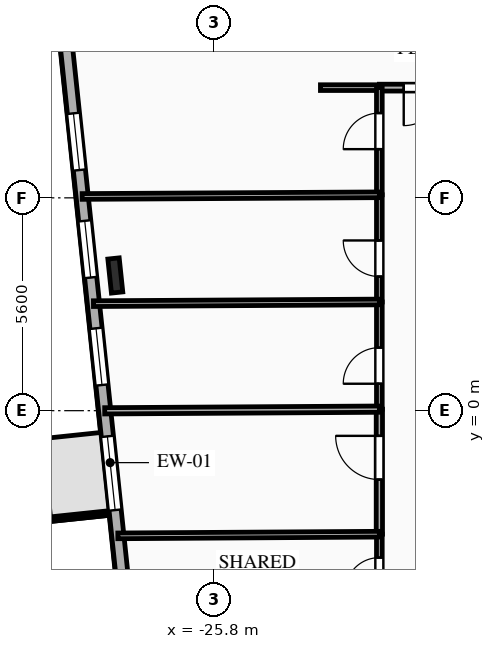
"""IFC4 building model, lengths in metres.
Left out: names, types, materials, properties, quantities, classifications, styles, units other than length and angle.
Written with IfcOpenShell. Run it as: python <this file> out.ifc"""

import sys

from ifc_helpers import new_model, si_unit, direction, frame, frame_2d, origin, origin_2d, place, context, subcontext, project, spatial, rectangle, i_section, extrude, element, fill, save


model = new_model("IFC4")
c1 = context("Model", 3, precision=1e-05, world=origin(), true_north=direction((0.0, 1.0)))
c2 = subcontext(c1, "Body", "Model", "MODEL_VIEW")
j1 = project(units=[si_unit("LENGTHUNIT", "METRE"), si_unit("PLANEANGLEUNIT", "RADIAN")], contexts=[c1])
p1 = place(None, origin())
s1 = spatial("IfcSite", under=j1, at=p1, CompositionType="ELEMENT")
p2 = place(p1, origin())
s2 = spatial("IfcBuilding", under=s1, at=p2, CompositionType="ELEMENT")
p3 = place(p2, frame((0.0, 0.0, 95.75)))
s3 = spatial("IfcBuildingStorey", under=s2, at=p3, CompositionType="ELEMENT", Elevation=95.75)
p4 = place(p3, frame((-28.398, 3.557, 0.0), z_axis=(0.0, 0.0, 1.0), x_axis=(0.994521895368, 0.104528463268, 0.0)))
e1 = element("IfcColumn", 1, at=p4, inside=s3, PredefinedType="COLUMN", context=c2, shape_type="SweptSolid", body=[
    extrude(i_section(OverallWidth=0.3, OverallDepth=0.9, WebThickness=0.019, FlangeThickness=0.035, FilletRadius=0.03, at=origin_2d()), origin(), (0.0, 0.0, 1.0), 3.35),
])
p5 = place(p3, frame((-26.935, -16.583, 0.0), z_axis=(0.0, 0.0, 1.0), x_axis=(-0.104524887486, 0.994522271192, 0.0)))
e2 = element("IfcWall", 2, at=p5, inside=s3, PredefinedType="SOLIDWALL", context=c2, shape_type="SweptSolid", body=[
    extrude(rectangle(XDim=30.6, YDim=0.32, at=frame_2d((15.3, 0.0))), origin(), (0.0, 0.0, 1.0), 3.045),
])
p6 = place(p5, frame((14.045, 0.0, 0.85)))
e3 = element("IfcOpeningElement", 3, at=p6, cuts=e2, PredefinedType="OPENING", context=c2, shape_type="SweptSolid", body=[
    extrude(rectangle(XDim=1.95, YDim=1.85, at=frame_2d((0.975, 0.925))), frame((0.0, 0.17, 0.0), z_axis=(0.0, -1.0, 0.0), x_axis=(1.0, 0.0, 0.0)), (0.0, 0.0, 1.0), 0.34),
])
p7 = place(p5, frame((17.354, 0.0, 0.85)))
e4 = element("IfcOpeningElement", 4, at=p7, cuts=e2, PredefinedType="OPENING", context=c2, shape_type="SweptSolid", body=[
    extrude(rectangle(XDim=1.5, YDim=1.85, at=frame_2d((0.75, 0.925))), frame((0.0, 0.17, 0.0), z_axis=(0.0, -1.0, 0.0), x_axis=(1.0, 0.0, 0.0)), (0.0, 0.0, 1.0), 0.34),
])
p8 = place(p5, frame((20.198, 0.0, 0.85)))
e5 = element("IfcOpeningElement", 5, at=p8, cuts=e2, PredefinedType="OPENING", context=c2, shape_type="SweptSolid", body=[
    extrude(rectangle(XDim=1.5, YDim=1.85, at=frame_2d((0.75, 0.925))), frame((0.0, 0.17, 0.0), z_axis=(0.0, -1.0, 0.0), x_axis=(1.0, 0.0, 0.0)), (0.0, 0.0, 1.0), 0.34),
])
p9 = place(p5, frame((23.041, 0.0, 0.85)))
e6 = element("IfcOpeningElement", 6, at=p9, cuts=e2, PredefinedType="OPENING", context=c2, shape_type="SweptSolid", body=[
    extrude(rectangle(XDim=1.5, YDim=1.85, at=frame_2d((0.75, 0.925))), frame((0.0, 0.17, 0.0), z_axis=(0.0, -1.0, 0.0), x_axis=(1.0, 0.0, 0.0)), (0.0, 0.0, 1.0), 0.34),
])
p10 = place(p3, frame((-18.8, 8.5, 0.0), z_axis=(0.0, 0.0, 1.0), x_axis=(-1.0, 0.0, 0.0)))
e7 = element("IfcWall", 7, at=p10, inside=s3, PredefinedType="PARTITIONING", context=c2, shape_type="SweptSolid", body=[
    extrude(rectangle(XDim=2.65, YDim=0.18, at=frame_2d((1.325, 0.0))), origin(), (0.0, 0.0, 1.0), 3.045),
])
p11 = place(p10, frame((1.009, 0.0, 0.0)))
e8 = element("IfcOpeningElement", 8, at=p11, cuts=e7, PredefinedType="OPENING", context=c2, shape_type="SweptSolid", body=[
    extrude(rectangle(XDim=1.0, YDim=2.15, at=frame_2d((0.5, 1.075))), frame((0.0, 0.1, 0.0), z_axis=(0.0, -1.0, 0.0), x_axis=(1.0, 0.0, 0.0)), (0.0, 0.0, 1.0), 0.2),
])
p12 = place(p3, frame((-21.45, 8.5, 0.0), z_axis=(0.0, 0.0, 1.0), x_axis=(-1.0, 0.0, 0.0)))
e9 = element("IfcWall", 9, at=p12, inside=s3, PredefinedType="PARTITIONING", context=c2, shape_type="SweptSolid", body=[
    extrude(rectangle(XDim=1.55, YDim=0.15, at=frame_2d((0.775, 0.0))), origin(), (0.0, 0.0, 1.0), 3.045),
])
p13 = place(p3, frame((-21.45, -5.6, 0.0), z_axis=(0.0, 0.0, 1.0), x_axis=(0.0, 1.0, 0.0)))
e10 = element("IfcWall", 10, at=p13, inside=s3, PredefinedType="PLUMBINGWALL", context=c2, shape_type="SweptSolid", body=[
    extrude(rectangle(XDim=2.35, YDim=0.15, at=frame_2d((1.175, 0.0))), origin(), (0.0, 0.0, 1.0), 3.045),
])
p14 = place(p13, frame((0.834, 0.0, 0.0)))
e11 = element("IfcOpeningElement", 11, at=p14, cuts=e10, PredefinedType="OPENING", context=c2, shape_type="SweptSolid", body=[
    extrude(rectangle(XDim=0.9, YDim=2.1, at=frame_2d((0.45, 1.05))), frame((0.0, 0.085, 0.0), z_axis=(0.0, -1.0, 0.0), x_axis=(1.0, 0.0, 0.0)), (0.0, 0.0, 1.0), 0.17),
])
p15 = place(p3, frame((-21.45, -3.25, 0.0), z_axis=(0.0, 0.0, 1.0), x_axis=(0.0, 1.0, 0.0)))
e12 = element("IfcWall", 12, at=p15, inside=s3, PredefinedType="PARTITIONING", context=c2, shape_type="SweptSolid", body=[
    extrude(rectangle(XDim=3.29, YDim=0.165, at=frame_2d((1.645, 0.0))), origin(), (0.0, 0.0, 1.0), 3.045),
])
p16 = place(p15, frame((1.438, 0.0, 0.0)))
e13 = element("IfcOpeningElement", 13, at=p16, cuts=e12, PredefinedType="OPENING", context=c2, shape_type="SweptSolid", body=[
    extrude(rectangle(XDim=1.15, YDim=2.15, at=frame_2d((0.575, 1.075))), frame((0.0, 0.093, 0.0), z_axis=(0.0, -1.0, 0.0), x_axis=(1.0, 0.0, 0.0)), (0.0, 0.0, 1.0), 0.185),
])
p17 = place(p3, frame((-21.45, 0.04, 0.0), z_axis=(0.0, 0.0, 1.0), x_axis=(0.0, 1.0, 0.0)))
e14 = element("IfcWall", 14, at=p17, inside=s3, PredefinedType="PARTITIONING", context=c2, shape_type="SweptSolid", body=[
    extrude(rectangle(XDim=2.82, YDim=0.15, at=frame_2d((1.41, 0.0))), origin(), (0.0, 0.0, 1.0), 3.045),
])
p18 = place(p17, frame((0.669, 0.0, 0.0)))
e15 = element("IfcOpeningElement", 15, at=p18, cuts=e14, PredefinedType="OPENING", context=c2, shape_type="SweptSolid", body=[
    extrude(rectangle(XDim=0.95, YDim=2.1, at=frame_2d((0.475, 1.05))), frame((0.0, 0.085, 0.0), z_axis=(0.0, -1.0, 0.0), x_axis=(1.0, 0.0, 0.0)), (0.0, 0.0, 1.0), 0.17),
])
p19 = place(p3, frame((-21.45, 2.86, 0.0), z_axis=(0.0, 0.0, 1.0), x_axis=(0.0, 1.0, 0.0)))
e16 = element("IfcWall", 16, at=p19, inside=s3, PredefinedType="PARTITIONING", context=c2, shape_type="SweptSolid", body=[
    extrude(rectangle(XDim=2.82, YDim=0.15, at=frame_2d((1.41, 0.0))), origin(), (0.0, 0.0, 1.0), 3.045),
])
p20 = place(p19, frame((0.669, 0.0, 0.0)))
e17 = element("IfcOpeningElement", 17, at=p20, cuts=e16, PredefinedType="OPENING", context=c2, shape_type="SweptSolid", body=[
    extrude(rectangle(XDim=0.95, YDim=2.1, at=frame_2d((0.475, 1.05))), frame((0.0, 0.085, 0.0), z_axis=(0.0, -1.0, 0.0), x_axis=(1.0, 0.0, 0.0)), (0.0, 0.0, 1.0), 0.17),
])
p21 = place(p3, frame((-21.45, 5.68, 0.0), z_axis=(0.0, 0.0, 1.0), x_axis=(0.0, 1.0, 0.0)))
e18 = element("IfcWall", 18, at=p21, inside=s3, PredefinedType="PARTITIONING", context=c2, shape_type="SweptSolid", body=[
    extrude(rectangle(XDim=2.82, YDim=0.15, at=frame_2d((1.41, 0.0))), origin(), (0.0, 0.0, 1.0), 3.045),
])
p22 = place(p21, frame((1.201, 0.0, 0.0)))
e19 = element("IfcOpeningElement", 19, at=p22, cuts=e18, PredefinedType="OPENING", context=c2, shape_type="SweptSolid", body=[
    extrude(rectangle(XDim=0.95, YDim=2.1, at=frame_2d((0.475, 1.05))), frame((0.0, 0.085, 0.0), z_axis=(0.0, -1.0, 0.0), x_axis=(1.0, 0.0, 0.0)), (0.0, 0.0, 1.0), 0.17),
])
p23 = place(p3, frame((-28.332, -3.294, 0.0), z_axis=(0.0, 0.0, 1.0), x_axis=(0.99997961062, 0.006385792383, 0.0)))
e20 = element("IfcWall", 20, at=p23, inside=s3, PredefinedType="PLUMBINGWALL", context=c2, shape_type="SweptSolid", body=[
    extrude(rectangle(XDim=6.882, YDim=0.15, at=frame_2d((3.441, 0.0))), origin(), (0.0, 0.0, 1.0), 3.045),
])
p24 = place(p3, frame((-28.677, -0.004, 0.0), z_axis=(0.0, 0.0, 1.0), x_axis=(0.999981514486, 0.006080352417, 0.0)))
e21 = element("IfcWall", 21, at=p24, inside=s3, PredefinedType="PARTITIONING", context=c2, shape_type="SweptSolid", body=[
    extrude(rectangle(XDim=7.228, YDim=0.165, at=frame_2d((3.614, 0.0))), origin(), (0.0, 0.0, 1.0), 3.045),
])
p25 = place(p3, frame((-28.974, 2.816, 0.0), z_axis=(0.0, 0.0, 1.0), x_axis=(0.999982942193, 0.00584083232, 0.0)))
e22 = element("IfcWall", 22, at=p25, inside=s3, PredefinedType="PARTITIONING", context=c2, shape_type="SweptSolid", body=[
    extrude(rectangle(XDim=7.524, YDim=0.15, at=frame_2d((3.762, 0.0))), origin(), (0.0, 0.0, 1.0), 2.53),
])
p26 = place(p3, frame((-29.27, 5.636, 0.0), z_axis=(0.0, 0.0, 1.0), x_axis=(0.999984210669, 0.005619467326, 0.0)))
e23 = element("IfcWall", 23, at=p26, inside=s3, PredefinedType="PARTITIONING", context=c2, shape_type="SweptSolid", body=[
    extrude(rectangle(XDim=7.82, YDim=0.15, at=frame_2d((3.91, 0.0))), origin(), (0.0, 0.0, 1.0), 3.045),
])
p27 = place(p6, origin())
e24 = element("IfcWindow", 24, at=p27, inside=s3, PartitioningType="SINGLE_PANEL", PredefinedType="WINDOW", context=c2, shape_type="SweptSolid", body=[
    extrude(rectangle(XDim=1.95, YDim=1.85, at=frame_2d((0.975, 0.925))), frame((0.0, 0.03, 0.0), z_axis=(0.0, -1.0, 0.0), x_axis=(1.0, 0.0, 0.0)), (0.0, 0.0, 1.0), 0.06),
])
fill(e3, e24)
p28 = place(p7, origin())
e25 = element("IfcWindow", 25, at=p28, inside=s3, PartitioningType="SINGLE_PANEL", PredefinedType="WINDOW", context=c2, shape_type="SweptSolid", body=[
    extrude(rectangle(XDim=1.5, YDim=1.85, at=frame_2d((0.75, 0.925))), frame((0.0, 0.03, 0.0), z_axis=(0.0, -1.0, 0.0), x_axis=(1.0, 0.0, 0.0)), (0.0, 0.0, 1.0), 0.06),
])
fill(e4, e25)
p29 = place(p8, origin())
e26 = element("IfcWindow", 26, at=p29, inside=s3, PartitioningType="SINGLE_PANEL", PredefinedType="WINDOW", context=c2, shape_type="SweptSolid", body=[
    extrude(rectangle(XDim=1.5, YDim=1.85, at=frame_2d((0.75, 0.925))), frame((0.0, 0.03, 0.0), z_axis=(0.0, -1.0, 0.0), x_axis=(1.0, 0.0, 0.0)), (0.0, 0.0, 1.0), 0.06),
])
fill(e5, e26)
p30 = place(p9, origin())
e27 = element("IfcWindow", 27, at=p30, inside=s3, PartitioningType="SINGLE_PANEL", PredefinedType="WINDOW", context=c2, shape_type="SweptSolid", body=[
    extrude(rectangle(XDim=1.5, YDim=1.85, at=frame_2d((0.75, 0.925))), frame((0.0, 0.03, 0.0), z_axis=(0.0, -1.0, 0.0), x_axis=(1.0, 0.0, 0.0)), (0.0, 0.0, 1.0), 0.06),
])
fill(e6, e27)
p31 = place(p11, origin())
e28 = element("IfcDoor", 28, at=p31, inside=s3, OperationType="SINGLE_SWING_RIGHT", PredefinedType="DOOR", context=c2, shape_type="SweptSolid", body=[
    extrude(rectangle(XDim=1.0, YDim=2.15, at=frame_2d((0.5, 1.075))), frame((0.0, 0.025, 0.0), z_axis=(0.0, -1.0, 0.0), x_axis=(1.0, 0.0, 0.0)), (0.0, 0.0, 1.0), 0.05),
])
fill(e8, e28)
p32 = place(p14, origin())
e29 = element("IfcDoor", 29, at=p32, inside=s3, OperationType="SINGLE_SWING_LEFT", PredefinedType="DOOR", context=c2, shape_type="SweptSolid", body=[
    extrude(rectangle(XDim=0.9, YDim=2.1, at=frame_2d((0.45, 1.05))), frame((0.0, 0.025, 0.0), z_axis=(0.0, -1.0, 0.0), x_axis=(1.0, 0.0, 0.0)), (0.0, 0.0, 1.0), 0.05),
])
fill(e11, e29)
p33 = place(p16, origin())
e30 = element("IfcDoor", 30, at=p33, inside=s3, OperationType="SINGLE_SWING_RIGHT", PredefinedType="DOOR", context=c2, shape_type="SweptSolid", body=[
    extrude(rectangle(XDim=1.15, YDim=2.15, at=frame_2d((0.575, 1.075))), frame((0.0, 0.025, 0.0), z_axis=(0.0, -1.0, 0.0), x_axis=(1.0, 0.0, 0.0)), (0.0, 0.0, 1.0), 0.05),
])
fill(e13, e30)
p34 = place(p18, origin())
e31 = element("IfcDoor", 31, at=p34, inside=s3, OperationType="SINGLE_SWING_LEFT", PredefinedType="DOOR", context=c2, shape_type="SweptSolid", body=[
    extrude(rectangle(XDim=0.95, YDim=2.1, at=frame_2d((0.475, 1.05))), frame((0.0, 0.025, 0.0), z_axis=(0.0, -1.0, 0.0), x_axis=(1.0, 0.0, 0.0)), (0.0, 0.0, 1.0), 0.05),
])
fill(e15, e31)
p35 = place(p20, origin())
e32 = element("IfcDoor", 32, at=p35, inside=s3, OperationType="SINGLE_SWING_RIGHT", PredefinedType="DOOR", context=c2, shape_type="SweptSolid", body=[
    extrude(rectangle(XDim=0.95, YDim=2.1, at=frame_2d((0.475, 1.05))), frame((0.0, 0.025, 0.0), z_axis=(0.0, -1.0, 0.0), x_axis=(1.0, 0.0, 0.0)), (0.0, 0.0, 1.0), 0.05),
])
fill(e17, e32)
p36 = place(p22, origin())
e33 = element("IfcDoor", 33, at=p36, inside=s3, OperationType="SINGLE_SWING_LEFT", PredefinedType="DOOR", context=c2, shape_type="SweptSolid", body=[
    extrude(rectangle(XDim=0.95, YDim=2.1, at=frame_2d((0.475, 1.05))), frame((0.0, 0.025, 0.0), z_axis=(0.0, -1.0, 0.0), x_axis=(1.0, 0.0, 0.0)), (0.0, 0.0, 1.0), 0.05),
])
fill(e19, e33)
save(model, sys.argv[1])
